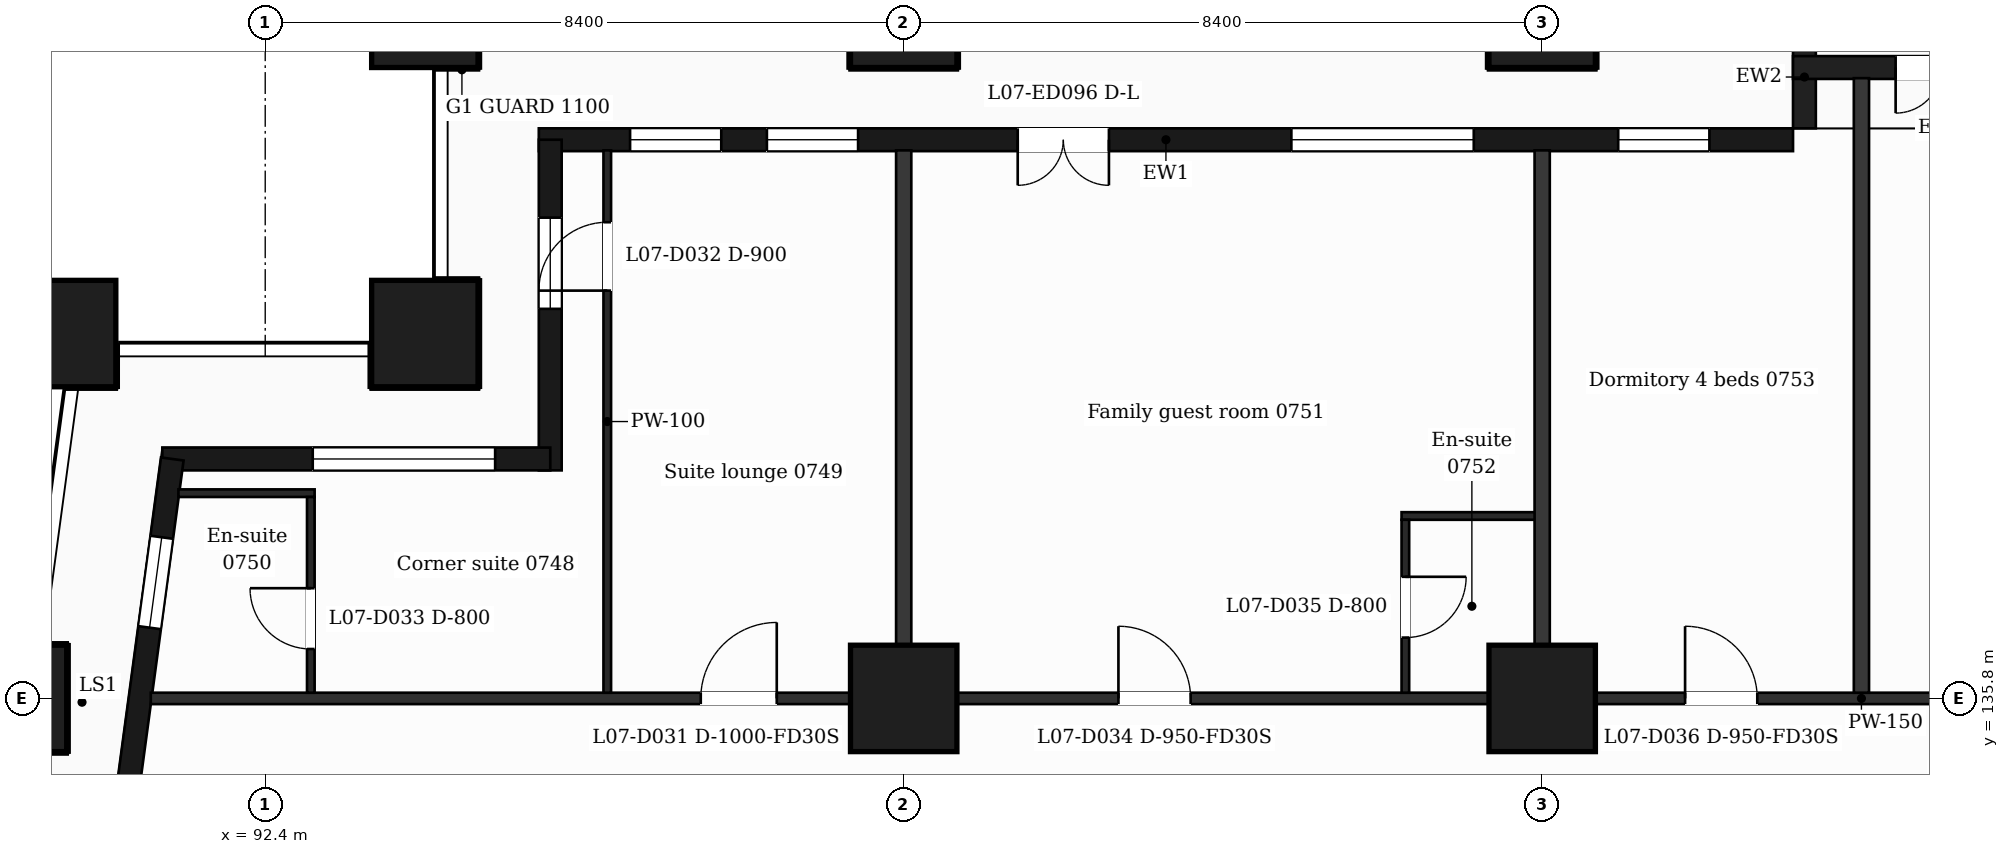
"""IFC4 building model, lengths in metres.
Left out: names, types, materials, properties, quantities, classifications, styles, units other than length and angle.
Written with IfcOpenShell. Run it as: python <this file> out.ifc"""

import sys

from ifc_helpers import new_model, si_unit, direction, frame, frame_2d, origin, origin_2d, place, context, subcontext, project, spatial, rectangle, extrude, element, fill, save


model = new_model("IFC4")
c1 = context("Model", 3, precision=1e-05, world=origin(), true_north=direction((0.0, 1.0)))
c2 = subcontext(c1, "Body", "Model", "MODEL_VIEW")
j1 = project(units=[si_unit("LENGTHUNIT", "METRE"), si_unit("PLANEANGLEUNIT", "RADIAN")], contexts=[c1])
p1 = place(None, origin())
s1 = spatial("IfcSite", under=j1, at=p1, CompositionType="ELEMENT")
p2 = place(p1, origin())
s2 = spatial("IfcBuilding", under=s1, at=p2, CompositionType="ELEMENT")
p3 = place(p2, frame((0.0, 0.0, 42.5)))
s3 = spatial("IfcBuildingStorey", under=s2, at=p3, CompositionType="ELEMENT", Elevation=42.5)
for number, where, z_axis, x_axis in (
    (1, (94.5, 140.6, 0.0), (0.0, 0.0, 1.0), (1.0, 0.0, 0.0)),
    (2, (89.735, 140.6, 0.0), (0.0, 0.0, 1.0), (1.0, 0.0, 0.0)),
    (3, (100.8, 135.8, 0.0), (0.0, 0.0, 1.0), (1.0, 0.0, 0.0)),
    (4, (109.2, 135.8, 0.0), (0.0, 0.0, 1.0), (1.0, 0.0, 0.0)),
    (5, (89.088, 135.8, 0.0), (0.0, 0.0, 1.0), (1.0, 0.0, 0.0)),
    (6, (100.8, 144.8, 0.0), (0.0, 0.0, 1.0), (1.0, 0.0, 0.0)),
    (7, (109.2, 144.8, 0.0), (0.0, 0.0, 1.0), (1.0, 0.0, 0.0)),
    (8, (94.5, 144.8, 0.0), (0.0, 0.0, 1.0), (1.0, 0.0, 0.0)),
):
    element("IfcColumn", number, at=place(p3, frame(where, z_axis=z_axis, x_axis=x_axis)), inside=s3, PredefinedType="COLUMN", context=c2, shape_type="SweptSolid", body=[
        extrude(rectangle(XDim=1.4, YDim=1.4, at=origin_2d()), origin(), (0.0, 0.0, 1.0), 3.5),
    ])
p4 = place(p3, frame((112.5, 143.15, 0.0), z_axis=(0.0, 0.0, 1.0), x_axis=(-1.0, 0.0, 0.0)))
e9 = element("IfcWall", 9, at=p4, inside=s3, PredefinedType="SOLIDWALL", context=c2, shape_type="SweptSolid", body=[
    extrude(rectangle(XDim=16.5, YDim=0.3, at=frame_2d((8.25, 0.0))), origin(), (0.0, 0.0, 1.0), 3.18),
])
p5 = place(p4, frame((1.1, 0.0, 0.9)))
e10 = element("IfcOpeningElement", 10, at=p5, cuts=e9, PredefinedType="OPENING", context=c2, shape_type="SweptSolid", body=[
    extrude(rectangle(XDim=1.2, YDim=2.1, at=frame_2d((0.6, 1.05))), frame((0.0, 0.16, 0.0), z_axis=(0.0, -1.0, 0.0), x_axis=(1.0, 0.0, 0.0)), (0.0, 0.0, 1.0), 0.32),
])
p6 = place(p4, frame((4.2, 0.0, 0.9)))
e11 = element("IfcOpeningElement", 11, at=p6, cuts=e9, PredefinedType="OPENING", context=c2, shape_type="SweptSolid", body=[
    extrude(rectangle(XDim=2.4, YDim=2.1, at=frame_2d((1.2, 1.05))), frame((0.0, 0.16, 0.0), z_axis=(0.0, -1.0, 0.0), x_axis=(1.0, 0.0, 0.0)), (0.0, 0.0, 1.0), 0.32),
])
p7 = place(p4, frame((9.0, 0.0, 0.0)))
e12 = element("IfcOpeningElement", 12, at=p7, cuts=e9, PredefinedType="OPENING", context=c2, shape_type="SweptSolid", body=[
    extrude(rectangle(XDim=1.2, YDim=2.4, at=frame_2d((0.6, 1.2))), frame((0.0, 0.16, 0.0), z_axis=(0.0, -1.0, 0.0), x_axis=(1.0, 0.0, 0.0)), (0.0, 0.0, 1.0), 0.32),
])
p8 = place(p4, frame((12.3, 0.0, 0.9)))
e13 = element("IfcOpeningElement", 13, at=p8, cuts=e9, PredefinedType="OPENING", context=c2, shape_type="SweptSolid", body=[
    extrude(rectangle(XDim=1.2, YDim=2.1, at=frame_2d((0.6, 1.05))), frame((0.0, 0.16, 0.0), z_axis=(0.0, -1.0, 0.0), x_axis=(1.0, 0.0, 0.0)), (0.0, 0.0, 1.0), 0.32),
])
p9 = place(p4, frame((14.1, 0.0, 0.9)))
e14 = element("IfcOpeningElement", 14, at=p9, cuts=e9, PredefinedType="OPENING", context=c2, shape_type="SweptSolid", body=[
    extrude(rectangle(XDim=1.2, YDim=2.1, at=frame_2d((0.6, 1.05))), frame((0.0, 0.16, 0.0), z_axis=(0.0, -1.0, 0.0), x_axis=(1.0, 0.0, 0.0)), (0.0, 0.0, 1.0), 0.32),
])
p10 = place(p3, frame((112.65, 143.3, 0.0), z_axis=(0.0, 0.0, 1.0), x_axis=(0.0, 1.0, 0.0)))
e15 = element("IfcWall", 15, at=p10, inside=s3, PredefinedType="SOLIDWALL", context=c2, shape_type="SweptSolid", body=[
    extrude(rectangle(XDim=1.35, YDim=0.3, at=frame_2d((0.675, 0.0))), origin(), (0.0, 0.0, 1.0), 3.18),
])
p11 = place(p3, frame((116.4, 144.1, 0.0), z_axis=(0.0, 0.0, 1.0), x_axis=(-1.0, 0.0, 0.0)))
e16 = element("IfcWall", 16, at=p11, inside=s3, PredefinedType="SOLIDWALL", context=c2, shape_type="SweptSolid", body=[
    extrude(rectangle(XDim=3.9, YDim=0.3, at=frame_2d((1.95, 0.0))), origin(), (0.0, 0.0, 1.0), 3.18),
])
p12 = place(p11, frame((1.35, 0.0, 0.0)))
e17 = element("IfcOpeningElement", 17, at=p12, cuts=e16, PredefinedType="OPENING", context=c2, shape_type="SweptSolid", body=[
    extrude(rectangle(XDim=1.2, YDim=2.4, at=frame_2d((0.6, 1.2))), frame((0.0, 0.16, 0.0), z_axis=(0.0, -1.0, 0.0), x_axis=(1.0, 0.0, 0.0)), (0.0, 0.0, 1.0), 0.32),
])
p13 = place(p3, frame((96.15, 143.15, 0.0), z_axis=(0.0, 0.0, 1.0), x_axis=(0.0, -1.0, 0.0)))
e18 = element("IfcWall", 18, at=p13, inside=s3, PredefinedType="SOLIDWALL", context=c2, shape_type="SweptSolid", body=[
    extrude(rectangle(XDim=4.35, YDim=0.3, at=frame_2d((2.175, 0.0))), origin(), (0.0, 0.0, 1.0), 3.18),
])
p14 = place(p13, frame((1.025, 0.0, 0.9)))
e19 = element("IfcOpeningElement", 19, at=p14, cuts=e18, PredefinedType="OPENING", context=c2, shape_type="SweptSolid", body=[
    extrude(rectangle(XDim=1.2, YDim=2.1, at=frame_2d((0.6, 1.05))), frame((0.0, 0.16, 0.0), z_axis=(0.0, -1.0, 0.0), x_axis=(1.0, 0.0, 0.0)), (0.0, 0.0, 1.0), 0.32),
])
p15 = place(p3, frame((96.15, 138.95, 0.0), z_axis=(0.0, 0.0, 1.0), x_axis=(-1.0, 0.0, 0.0)))
e20 = element("IfcWall", 20, at=p15, inside=s3, PredefinedType="SOLIDWALL", context=c2, shape_type="SweptSolid", body=[
    extrude(rectangle(XDim=5.104, YDim=0.3, at=frame_2d((2.552, 0.0))), origin(), (0.0, 0.0, 1.0), 3.18),
])
p16 = place(p15, frame((0.725, 0.0, 0.9)))
e21 = element("IfcOpeningElement", 21, at=p16, cuts=e20, PredefinedType="OPENING", context=c2, shape_type="SweptSolid", body=[
    extrude(rectangle(XDim=2.4, YDim=2.1, at=frame_2d((1.2, 1.05))), frame((0.0, 0.16, 0.0), z_axis=(0.0, -1.0, 0.0), x_axis=(1.0, 0.0, 0.0)), (0.0, 0.0, 1.0), 0.32),
])
p17 = place(p3, frame((91.177, 138.95, 0.0), z_axis=(0.0, 0.0, 1.0), x_axis=(-0.133426664613, -0.991058689065, 0.0)))
e22 = element("IfcWall", 22, at=p17, inside=s3, PredefinedType="SOLIDWALL", context=c2, shape_type="SweptSolid", body=[
    extrude(rectangle(XDim=6.609, YDim=0.3, at=frame_2d((3.305, 0.0))), origin(), (0.0, 0.0, 1.0), 3.18),
])
p18 = place(p17, frame((1.039, 0.0, 0.9)))
e23 = element("IfcOpeningElement", 23, at=p18, cuts=e22, PredefinedType="OPENING", context=c2, shape_type="SweptSolid", body=[
    extrude(rectangle(XDim=1.2, YDim=2.1, at=frame_2d((0.6, 1.05))), frame((0.0, 0.16, 0.0), z_axis=(0.0, -1.0, 0.0), x_axis=(1.0, 0.0, 0.0)), (0.0, 0.0, 1.0), 0.32),
])
p19 = place(p17, frame((4.294, 0.0, 0.0)))
e24 = element("IfcOpeningElement", 24, at=p19, cuts=e22, PredefinedType="OPENING", context=c2, shape_type="SweptSolid", body=[
    extrude(rectangle(XDim=1.2, YDim=2.4, at=frame_2d((0.6, 1.2))), frame((0.0, 0.16, 0.0), z_axis=(0.0, -1.0, 0.0), x_axis=(1.0, 0.0, 0.0)), (0.0, 0.0, 1.0), 0.32),
])
p20 = place(p3, frame((90.895, 135.8, 0.0), z_axis=(0.0, 0.0, 1.0), x_axis=(1.0, 0.0, 0.0)))
e25 = element("IfcWall", 25, at=p20, inside=s3, PredefinedType="PARTITIONING", context=c2, shape_type="SweptSolid", body=[
    extrude(rectangle(XDim=45.011, YDim=0.15, at=frame_2d((22.505, 0.0))), origin(), (0.0, 0.0, 1.0), 3.18),
])
p21 = place(p20, frame((7.235, 0.0, 0.0)))
e26 = element("IfcOpeningElement", 26, at=p21, cuts=e25, PredefinedType="OPENING", context=c2, shape_type="SweptSolid", body=[
    extrude(rectangle(XDim=1.0, YDim=2.1, at=frame_2d((0.5, 1.05))), frame((0.0, 0.085, 0.0), z_axis=(0.0, -1.0, 0.0), x_axis=(1.0, 0.0, 0.0)), (0.0, 0.0, 1.0), 0.17),
])
p22 = place(p20, frame((12.73, 0.0, 0.0)))
e27 = element("IfcOpeningElement", 27, at=p22, cuts=e25, PredefinedType="OPENING", context=c2, shape_type="SweptSolid", body=[
    extrude(rectangle(XDim=0.95, YDim=2.1, at=frame_2d((0.475, 1.05))), frame((0.0, 0.085, 0.0), z_axis=(0.0, -1.0, 0.0), x_axis=(1.0, 0.0, 0.0)), (0.0, 0.0, 1.0), 0.17),
])
p23 = place(p20, frame((20.185, 0.0, 0.0)))
e28 = element("IfcOpeningElement", 28, at=p23, cuts=e25, PredefinedType="OPENING", context=c2, shape_type="SweptSolid", body=[
    extrude(rectangle(XDim=0.95, YDim=2.1, at=frame_2d((0.475, 1.05))), frame((0.0, 0.085, 0.0), z_axis=(0.0, -1.0, 0.0), x_axis=(1.0, 0.0, 0.0)), (0.0, 0.0, 1.0), 0.17),
])
p24 = place(p20, frame((24.531, 0.0, 0.0)))
e29 = element("IfcOpeningElement", 29, at=p24, cuts=e25, PredefinedType="OPENING", context=c2, shape_type="SweptSolid", body=[
    extrude(rectangle(XDim=1.0, YDim=2.1, at=frame_2d((0.5, 1.05))), frame((0.0, 0.085, 0.0), z_axis=(0.0, -1.0, 0.0), x_axis=(1.0, 0.0, 0.0)), (0.0, 0.0, 1.0), 0.17),
])
p25 = place(p20, frame((36.335, 0.0, 0.0)))
e30 = element("IfcOpeningElement", 30, at=p25, cuts=e25, PredefinedType="OPENING", context=c2, shape_type="SweptSolid", body=[
    extrude(rectangle(XDim=1.0, YDim=2.1, at=frame_2d((0.5, 1.05))), frame((0.0, 0.085, 0.0), z_axis=(0.0, -1.0, 0.0), x_axis=(1.0, 0.0, 0.0)), (0.0, 0.0, 1.0), 0.17),
])
p26 = place(p3, frame((107.35, 138.2, 0.0), z_axis=(0.0, 0.0, 1.0), x_axis=(1.0, 0.0, 0.0)))
e31 = element("IfcWall", 31, at=p26, inside=s3, PredefinedType="PARTITIONING", context=c2, shape_type="SweptSolid", body=[
    extrude(rectangle(XDim=1.85, YDim=0.1, at=frame_2d((0.925, 0.0))), origin(), (0.0, 0.0, 1.0), 3.18),
])
p27 = place(p3, frame((91.258, 138.5, 0.0), z_axis=(0.0, 0.0, 1.0), x_axis=(1.0, 0.0, 0.0)))
e32 = element("IfcWall", 32, at=p27, inside=s3, PredefinedType="PARTITIONING", context=c2, shape_type="SweptSolid", body=[
    extrude(rectangle(XDim=1.792, YDim=0.1, at=frame_2d((0.896, 0.0))), origin(), (0.0, 0.0, 1.0), 3.18),
])
p28 = place(p3, frame((93.0, 135.875, 0.0), z_axis=(0.0, 0.0, 1.0), x_axis=(0.0, 1.0, 0.0)))
e33 = element("IfcWall", 33, at=p28, inside=s3, PredefinedType="PARTITIONING", context=c2, shape_type="SweptSolid", body=[
    extrude(rectangle(XDim=2.575, YDim=0.1, at=frame_2d((1.288, 0.0))), origin(), (0.0, 0.0, 1.0), 3.18),
])
p29 = place(p28, frame((0.575, 0.0, 0.0)))
e34 = element("IfcOpeningElement", 34, at=p29, cuts=e33, PredefinedType="OPENING", context=c2, shape_type="SweptSolid", body=[
    extrude(rectangle(XDim=0.8, YDim=2.1, at=frame_2d((0.4, 1.05))), frame((0.0, 0.06, 0.0), z_axis=(0.0, -1.0, 0.0), x_axis=(1.0, 0.0, 0.0)), (0.0, 0.0, 1.0), 0.12),
])
p30 = place(p3, frame((96.9, 135.875, 0.0), z_axis=(0.0, 0.0, 1.0), x_axis=(0.0, 1.0, 0.0)))
e35 = element("IfcWall", 35, at=p30, inside=s3, PredefinedType="PARTITIONING", context=c2, shape_type="SweptSolid", body=[
    extrude(rectangle(XDim=7.135, YDim=0.1, at=frame_2d((3.567, 0.0))), origin(), (0.0, 0.0, 1.0), 3.18),
])
p31 = place(p30, frame((5.29, 0.0, 0.0)))
e36 = element("IfcOpeningElement", 36, at=p31, cuts=e35, PredefinedType="OPENING", context=c2, shape_type="SweptSolid", body=[
    extrude(rectangle(XDim=0.9, YDim=2.1, at=frame_2d((0.45, 1.05))), frame((0.0, 0.06, 0.0), z_axis=(0.0, -1.0, 0.0), x_axis=(1.0, 0.0, 0.0)), (0.0, 0.0, 1.0), 0.12),
])
p32 = place(p3, frame((100.8, 135.875, 0.0), z_axis=(0.0, 0.0, 1.0), x_axis=(0.0, 1.0, 0.0)))
e37 = element("IfcWall", 37, at=p32, inside=s3, PredefinedType="PARTITIONING", context=c2, shape_type="SweptSolid", body=[
    extrude(rectangle(XDim=7.135, YDim=0.2, at=frame_2d((3.567, 0.0))), origin(), (0.0, 0.0, 1.0), 3.18),
])
p33 = place(p3, frame((107.4, 135.875, 0.0), z_axis=(0.0, 0.0, 1.0), x_axis=(0.0, 1.0, 0.0)))
e38 = element("IfcWall", 38, at=p33, inside=s3, PredefinedType="PARTITIONING", context=c2, shape_type="SweptSolid", body=[
    extrude(rectangle(XDim=2.275, YDim=0.1, at=frame_2d((1.137, 0.0))), origin(), (0.0, 0.0, 1.0), 3.18),
])
p34 = place(p33, frame((0.725, 0.0, 0.0)))
e39 = element("IfcOpeningElement", 39, at=p34, cuts=e38, PredefinedType="OPENING", context=c2, shape_type="SweptSolid", body=[
    extrude(rectangle(XDim=0.8, YDim=2.1, at=frame_2d((0.4, 1.05))), frame((0.0, 0.06, 0.0), z_axis=(0.0, -1.0, 0.0), x_axis=(1.0, 0.0, 0.0)), (0.0, 0.0, 1.0), 0.12),
])
p35 = place(p3, frame((109.2, 135.875, 0.0), z_axis=(0.0, 0.0, 1.0), x_axis=(0.0, 1.0, 0.0)))
e40 = element("IfcWall", 40, at=p35, inside=s3, PredefinedType="PARTITIONING", context=c2, shape_type="SweptSolid", body=[
    extrude(rectangle(XDim=7.135, YDim=0.2, at=frame_2d((3.567, 0.0))), origin(), (0.0, 0.0, 1.0), 3.18),
])
p36 = place(p3, frame((113.4, 135.875, 0.0), z_axis=(0.0, 0.0, 1.0), x_axis=(0.0, 1.0, 0.0)))
e41 = element("IfcWall", 41, at=p36, inside=s3, PredefinedType="PARTITIONING", context=c2, shape_type="SweptSolid", body=[
    extrude(rectangle(XDim=8.085, YDim=0.2, at=frame_2d((4.042, 0.0))), origin(), (0.0, 0.0, 1.0), 3.18),
])
p37 = place(p5, origin())
e42 = element("IfcWindow", 42, at=p37, inside=s3, PartitioningType="SINGLE_PANEL", PredefinedType="WINDOW", context=c2, shape_type="SweptSolid", body=[
    extrude(rectangle(XDim=1.2, YDim=2.1, at=frame_2d((0.6, 1.05))), frame((0.0, 0.03, 0.0), z_axis=(0.0, -1.0, 0.0), x_axis=(1.0, 0.0, 0.0)), (0.0, 0.0, 1.0), 0.06),
])
fill(e10, e42)
p38 = place(p6, origin())
e43 = element("IfcWindow", 43, at=p38, inside=s3, PartitioningType="SINGLE_PANEL", PredefinedType="WINDOW", context=c2, shape_type="SweptSolid", body=[
    extrude(rectangle(XDim=2.4, YDim=2.1, at=frame_2d((1.2, 1.05))), frame((0.0, 0.03, 0.0), z_axis=(0.0, -1.0, 0.0), x_axis=(1.0, 0.0, 0.0)), (0.0, 0.0, 1.0), 0.06),
])
fill(e11, e43)
p39 = place(p7, origin())
e44 = element("IfcDoor", 44, at=p39, inside=s3, OperationType="DOUBLE_DOOR_SINGLE_SWING", PredefinedType="DOOR", context=c2, shape_type="SweptSolid", body=[
    extrude(rectangle(XDim=1.2, YDim=2.4, at=frame_2d((0.6, 1.2))), frame((0.0, 0.025, 0.0), z_axis=(0.0, -1.0, 0.0), x_axis=(1.0, 0.0, 0.0)), (0.0, 0.0, 1.0), 0.05),
])
fill(e12, e44)
p40 = place(p8, origin())
e45 = element("IfcWindow", 45, at=p40, inside=s3, PartitioningType="SINGLE_PANEL", PredefinedType="WINDOW", context=c2, shape_type="SweptSolid", body=[
    extrude(rectangle(XDim=1.2, YDim=2.1, at=frame_2d((0.6, 1.05))), frame((0.0, 0.03, 0.0), z_axis=(0.0, -1.0, 0.0), x_axis=(1.0, 0.0, 0.0)), (0.0, 0.0, 1.0), 0.06),
])
fill(e13, e45)
p41 = place(p9, origin())
e46 = element("IfcWindow", 46, at=p41, inside=s3, PartitioningType="SINGLE_PANEL", PredefinedType="WINDOW", context=c2, shape_type="SweptSolid", body=[
    extrude(rectangle(XDim=1.2, YDim=2.1, at=frame_2d((0.6, 1.05))), frame((0.0, 0.03, 0.0), z_axis=(0.0, -1.0, 0.0), x_axis=(1.0, 0.0, 0.0)), (0.0, 0.0, 1.0), 0.06),
])
fill(e14, e46)
p42 = place(p12, origin())
e47 = element("IfcDoor", 47, at=p42, inside=s3, OperationType="DOUBLE_DOOR_SINGLE_SWING", PredefinedType="DOOR", context=c2, shape_type="SweptSolid", body=[
    extrude(rectangle(XDim=1.2, YDim=2.4, at=frame_2d((0.6, 1.2))), frame((0.0, 0.025, 0.0), z_axis=(0.0, -1.0, 0.0), x_axis=(1.0, 0.0, 0.0)), (0.0, 0.0, 1.0), 0.05),
])
fill(e17, e47)
p43 = place(p14, origin())
e48 = element("IfcWindow", 48, at=p43, inside=s3, PartitioningType="SINGLE_PANEL", PredefinedType="WINDOW", context=c2, shape_type="SweptSolid", body=[
    extrude(rectangle(XDim=1.2, YDim=2.1, at=frame_2d((0.6, 1.05))), frame((0.0, 0.03, 0.0), z_axis=(0.0, -1.0, 0.0), x_axis=(1.0, 0.0, 0.0)), (0.0, 0.0, 1.0), 0.06),
])
fill(e19, e48)
p44 = place(p16, origin())
e49 = element("IfcWindow", 49, at=p44, inside=s3, PartitioningType="SINGLE_PANEL", PredefinedType="WINDOW", context=c2, shape_type="SweptSolid", body=[
    extrude(rectangle(XDim=2.4, YDim=2.1, at=frame_2d((1.2, 1.05))), frame((0.0, 0.03, 0.0), z_axis=(0.0, -1.0, 0.0), x_axis=(1.0, 0.0, 0.0)), (0.0, 0.0, 1.0), 0.06),
])
fill(e21, e49)
p45 = place(p18, origin())
e50 = element("IfcWindow", 50, at=p45, inside=s3, PartitioningType="SINGLE_PANEL", PredefinedType="WINDOW", context=c2, shape_type="SweptSolid", body=[
    extrude(rectangle(XDim=1.2, YDim=2.1, at=frame_2d((0.6, 1.05))), frame((0.0, 0.03, 0.0), z_axis=(0.0, -1.0, 0.0), x_axis=(1.0, 0.0, 0.0)), (0.0, 0.0, 1.0), 0.06),
])
fill(e23, e50)
p46 = place(p21, origin())
e51 = element("IfcDoor", 51, at=p46, inside=s3, OperationType="SINGLE_SWING_RIGHT", PredefinedType="DOOR", context=c2, shape_type="SweptSolid", body=[
    extrude(rectangle(XDim=1.0, YDim=2.1, at=frame_2d((0.5, 1.05))), frame((0.0, 0.025, 0.0), z_axis=(0.0, -1.0, 0.0), x_axis=(1.0, 0.0, 0.0)), (0.0, 0.0, 1.0), 0.05),
])
fill(e26, e51)
p47 = place(p31, origin())
e52 = element("IfcDoor", 52, at=p47, inside=s3, OperationType="SINGLE_SWING_LEFT", PredefinedType="DOOR", context=c2, shape_type="SweptSolid", body=[
    extrude(rectangle(XDim=0.9, YDim=2.1, at=frame_2d((0.45, 1.05))), frame((0.0, 0.025, 0.0), z_axis=(0.0, -1.0, 0.0), x_axis=(1.0, 0.0, 0.0)), (0.0, 0.0, 1.0), 0.05),
])
fill(e36, e52)
p48 = place(p29, origin())
e53 = element("IfcDoor", 53, at=p48, inside=s3, OperationType="SINGLE_SWING_RIGHT", PredefinedType="DOOR", context=c2, shape_type="SweptSolid", body=[
    extrude(rectangle(XDim=0.8, YDim=2.1, at=frame_2d((0.4, 1.05))), frame((0.0, 0.025, 0.0), z_axis=(0.0, -1.0, 0.0), x_axis=(1.0, 0.0, 0.0)), (0.0, 0.0, 1.0), 0.05),
])
fill(e34, e53)
p49 = place(p22, origin())
e54 = element("IfcDoor", 54, at=p49, inside=s3, OperationType="SINGLE_SWING_LEFT", PredefinedType="DOOR", context=c2, shape_type="SweptSolid", body=[
    extrude(rectangle(XDim=0.95, YDim=2.1, at=frame_2d((0.475, 1.05))), frame((0.0, 0.025, 0.0), z_axis=(0.0, -1.0, 0.0), x_axis=(1.0, 0.0, 0.0)), (0.0, 0.0, 1.0), 0.05),
])
fill(e27, e54)
p50 = place(p34, origin())
e55 = element("IfcDoor", 55, at=p50, inside=s3, OperationType="SINGLE_SWING_RIGHT", PredefinedType="DOOR", context=c2, shape_type="SweptSolid", body=[
    extrude(rectangle(XDim=0.8, YDim=2.1, at=frame_2d((0.4, 1.05))), frame((0.0, 0.025, 0.0), z_axis=(0.0, -1.0, 0.0), x_axis=(1.0, 0.0, 0.0)), (0.0, 0.0, 1.0), 0.05),
])
fill(e39, e55)
p51 = place(p23, origin())
e56 = element("IfcDoor", 56, at=p51, inside=s3, OperationType="SINGLE_SWING_LEFT", PredefinedType="DOOR", context=c2, shape_type="SweptSolid", body=[
    extrude(rectangle(XDim=0.95, YDim=2.1, at=frame_2d((0.475, 1.05))), frame((0.0, 0.025, 0.0), z_axis=(0.0, -1.0, 0.0), x_axis=(1.0, 0.0, 0.0)), (0.0, 0.0, 1.0), 0.05),
])
fill(e28, e56)
save(model, sys.argv[1])
